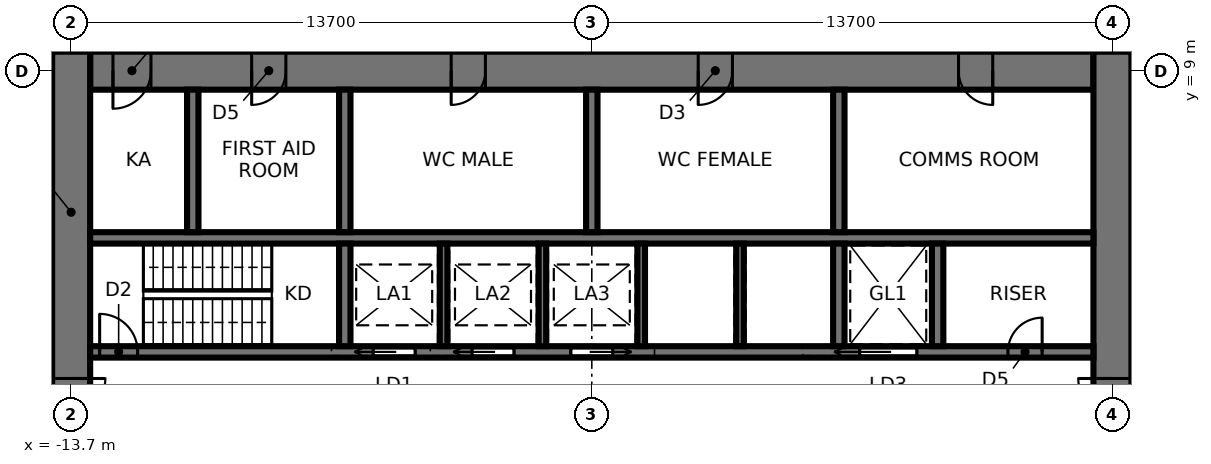
"""IFC4 building model, lengths in metres.
Left out: names, types, materials, properties, quantities, classifications, styles, units other than length and angle.
Written with IfcOpenShell. Run it as: python <this file> out.ifc"""

import sys

from ifc_helpers import new_model, si_unit, direction, frame, frame_2d, origin, place, context, subcontext, project, spatial, rectangle, extrude, element, fill, save


model = new_model("IFC4")
c1 = context("Model", 3, precision=1e-05, world=origin(), true_north=direction((0.0, 1.0)))
c2 = subcontext(c1, "Body", "Model", "MODEL_VIEW")
j1 = project(units=[si_unit("LENGTHUNIT", "METRE"), si_unit("PLANEANGLEUNIT", "RADIAN")], contexts=[c1])
p1 = place(None, origin())
s1 = spatial("IfcSite", under=j1, at=p1, CompositionType="ELEMENT")
p2 = place(p1, origin())
s2 = spatial("IfcBuilding", under=s1, at=p2, CompositionType="ELEMENT")
p3 = place(p2, frame((0.0, 0.0, 5.6)))
s3 = spatial("IfcBuildingStorey", under=s2, at=p3, CompositionType="ELEMENT", Elevation=5.6)
p4 = place(p3, frame((13.2, 9.0, 0.0), z_axis=(0.0, 0.0, 1.0), x_axis=(-1.0, 0.0, 0.0)))
e1 = element("IfcWall", 1, at=p4, inside=s3, PredefinedType="SHEAR", context=c2, shape_type="SweptSolid", body=[
    extrude(rectangle(XDim=26.4, YDim=1.0, at=frame_2d((13.2, 0.0))), origin(), (0.0, 0.0, 1.0), 5.0),
])
p5 = place(p4, frame((2.65, 0.0, 0.0)))
e2 = element("IfcOpeningElement", 2, at=p5, cuts=e1, PredefinedType="OPENING", context=c2, shape_type="SweptSolid", body=[
    extrude(rectangle(XDim=0.9, YDim=2.1, at=frame_2d((0.45, 1.05))), frame((0.0, 0.51, 0.0), z_axis=(0.0, -1.0, 0.0), x_axis=(1.0, 0.0, 0.0)), (0.0, 0.0, 1.0), 1.02),
])
p6 = place(p4, frame((9.5, 0.0, 0.0)))
e3 = element("IfcOpeningElement", 3, at=p6, cuts=e1, PredefinedType="OPENING", context=c2, shape_type="SweptSolid", body=[
    extrude(rectangle(XDim=0.9, YDim=2.1, at=frame_2d((0.45, 1.05))), frame((0.0, 0.51, 0.0), z_axis=(0.0, -1.0, 0.0), x_axis=(1.0, 0.0, 0.0)), (0.0, 0.0, 1.0), 1.02),
])
p7 = place(p4, frame((16.0, 0.0, 0.0)))
e4 = element("IfcOpeningElement", 4, at=p7, cuts=e1, PredefinedType="OPENING", context=c2, shape_type="SweptSolid", body=[
    extrude(rectangle(XDim=0.9, YDim=2.1, at=frame_2d((0.45, 1.05))), frame((0.0, 0.51, 0.0), z_axis=(0.0, -1.0, 0.0), x_axis=(1.0, 0.0, 0.0)), (0.0, 0.0, 1.0), 1.02),
])
p8 = place(p4, frame((21.25, 0.0, 0.0)))
e5 = element("IfcOpeningElement", 5, at=p8, cuts=e1, PredefinedType="OPENING", context=c2, shape_type="SweptSolid", body=[
    extrude(rectangle(XDim=0.9, YDim=2.1, at=frame_2d((0.45, 1.05))), frame((0.0, 0.51, 0.0), z_axis=(0.0, -1.0, 0.0), x_axis=(1.0, 0.0, 0.0)), (0.0, 0.0, 1.0), 1.02),
])
p9 = place(p4, frame((24.8, 0.0, 0.0)))
e6 = element("IfcOpeningElement", 6, at=p9, cuts=e1, PredefinedType="OPENING", context=c2, shape_type="SweptSolid", body=[
    extrude(rectangle(XDim=1.0, YDim=2.1, at=frame_2d((0.5, 1.05))), frame((0.0, 0.51, 0.0), z_axis=(0.0, -1.0, 0.0), x_axis=(1.0, 0.0, 0.0)), (0.0, 0.0, 1.0), 1.02),
])
p10 = place(p3, frame((13.7, -9.5, 0.0), z_axis=(0.0, 0.0, 1.0), x_axis=(0.0, 1.0, 0.0)))
e7 = element("IfcWall", 7, at=p10, inside=s3, PredefinedType="SHEAR", context=c2, shape_type="SweptSolid", body=[
    extrude(rectangle(XDim=19.0, YDim=1.0, at=frame_2d((9.5, 0.0))), origin(), (0.0, 0.0, 1.0), 5.0),
])
p11 = place(p10, frame((8.6, 0.0, 0.0)))
e8 = element("IfcOpeningElement", 8, at=p11, cuts=e7, PredefinedType="OPENING", context=c2, shape_type="SweptSolid", body=[
    extrude(rectangle(XDim=1.8, YDim=2.4, at=frame_2d((0.9, 1.2))), frame((0.0, 0.51, 0.0), z_axis=(0.0, -1.0, 0.0), x_axis=(1.0, 0.0, 0.0)), (0.0, 0.0, 1.0), 1.02),
])
p12 = place(p3, frame((-13.7, 9.5, 0.0), z_axis=(0.0, 0.0, 1.0), x_axis=(0.0, -1.0, 0.0)))
e9 = element("IfcWall", 9, at=p12, inside=s3, PredefinedType="SHEAR", context=c2, shape_type="SweptSolid", body=[
    extrude(rectangle(XDim=19.0, YDim=1.0, at=frame_2d((9.5, 0.0))), origin(), (0.0, 0.0, 1.0), 5.0),
])
p13 = place(p12, frame((8.6, 0.0, 0.0)))
e10 = element("IfcOpeningElement", 10, at=p13, cuts=e9, PredefinedType="OPENING", context=c2, shape_type="SweptSolid", body=[
    extrude(rectangle(XDim=1.8, YDim=2.4, at=frame_2d((0.9, 1.2))), frame((0.0, 0.51, 0.0), z_axis=(0.0, -1.0, 0.0), x_axis=(1.0, 0.0, 0.0)), (0.0, 0.0, 1.0), 1.02),
])
p14 = place(p3, frame((-13.2, 1.6, 0.0), z_axis=(0.0, 0.0, 1.0), x_axis=(1.0, 0.0, 0.0)))
e11 = element("IfcWall", 11, at=p14, inside=s3, PredefinedType="SHEAR", context=c2, shape_type="SweptSolid", body=[
    extrude(rectangle(XDim=26.4, YDim=0.3, at=frame_2d((13.2, 0.0))), origin(), (0.0, 0.0, 1.0), 5.0),
])
p15 = place(p14, frame((0.25, 0.0, 0.0)))
e12 = element("IfcOpeningElement", 12, at=p15, cuts=e11, PredefinedType="OPENING", context=c2, shape_type="SweptSolid", body=[
    extrude(rectangle(XDim=1.0, YDim=2.1, at=frame_2d((0.5, 1.05))), frame((0.0, 0.16, 0.0), z_axis=(0.0, -1.0, 0.0), x_axis=(1.0, 0.0, 0.0)), (0.0, 0.0, 1.0), 0.32),
])
p16 = place(p14, frame((20.25, 0.0, 0.0)))
e13 = element("IfcOpeningElement", 13, at=p16, cuts=e11, PredefinedType="OPENING", context=c2, shape_type="SweptSolid", body=[
    extrude(rectangle(XDim=1.5, YDim=2.4, at=frame_2d((0.75, 1.2))), frame((0.0, 0.16, 0.0), z_axis=(0.0, -1.0, 0.0), x_axis=(1.0, 0.0, 0.0)), (0.0, 0.0, 1.0), 0.32),
])
p17 = place(p14, frame((7.45, 0.0, 0.0)))
e14 = element("IfcOpeningElement", 14, at=p17, cuts=e11, PredefinedType="OPENING", context=c2, shape_type="SweptSolid", body=[
    extrude(rectangle(XDim=1.1, YDim=2.3, at=frame_2d((0.55, 1.15))), frame((0.0, 0.16, 0.0), z_axis=(0.0, -1.0, 0.0), x_axis=(1.0, 0.0, 0.0)), (0.0, 0.0, 1.0), 0.32),
])
p18 = place(p14, frame((10.05, 0.0, 0.0)))
e15 = element("IfcOpeningElement", 15, at=p18, cuts=e11, PredefinedType="OPENING", context=c2, shape_type="SweptSolid", body=[
    extrude(rectangle(XDim=1.1, YDim=2.3, at=frame_2d((0.55, 1.15))), frame((0.0, 0.16, 0.0), z_axis=(0.0, -1.0, 0.0), x_axis=(1.0, 0.0, 0.0)), (0.0, 0.0, 1.0), 0.32),
])
p19 = place(p14, frame((12.65, 0.0, 0.0)))
e16 = element("IfcOpeningElement", 16, at=p19, cuts=e11, PredefinedType="OPENING", context=c2, shape_type="SweptSolid", body=[
    extrude(rectangle(XDim=1.1, YDim=2.3, at=frame_2d((0.55, 1.15))), frame((0.0, 0.16, 0.0), z_axis=(0.0, -1.0, 0.0), x_axis=(1.0, 0.0, 0.0)), (0.0, 0.0, 1.0), 0.32),
])
p20 = place(p14, frame((24.15, 0.0, 0.0)))
e17 = element("IfcOpeningElement", 17, at=p20, cuts=e11, PredefinedType="OPENING", context=c2, shape_type="SweptSolid", body=[
    extrude(rectangle(XDim=0.9, YDim=2.1, at=frame_2d((0.45, 1.05))), frame((0.0, 0.16, 0.0), z_axis=(0.0, -1.0, 0.0), x_axis=(1.0, 0.0, 0.0)), (0.0, 0.0, 1.0), 0.32),
])
p21 = place(p3, frame((-13.2, 4.6, 0.0), z_axis=(0.0, 0.0, 1.0), x_axis=(1.0, 0.0, 0.0)))
e18 = element("IfcWall", 18, at=p21, inside=s3, PredefinedType="SHEAR", context=c2, shape_type="SweptSolid", body=[
    extrude(rectangle(XDim=26.4, YDim=0.3, at=frame_2d((13.2, 0.0))), origin(), (0.0, 0.0, 1.0), 5.0),
])
p22 = place(p3, frame((-6.5, 1.75, 0.0), z_axis=(0.0, 0.0, 1.0), x_axis=(0.0, 1.0, 0.0)))
e19 = element("IfcWall", 19, at=p22, inside=s3, PredefinedType="SHEAR", context=c2, shape_type="SweptSolid", body=[
    extrude(rectangle(XDim=2.7, YDim=0.3, at=frame_2d((1.35, 0.0))), origin(), (0.0, 0.0, 1.0), 5.0),
])
p23 = place(p3, frame((-6.5, 4.75, 0.0), z_axis=(0.0, 0.0, 1.0), x_axis=(0.0, 1.0, 0.0)))
e20 = element("IfcWall", 20, at=p23, inside=s3, PredefinedType="SHEAR", context=c2, shape_type="SweptSolid", body=[
    extrude(rectangle(XDim=3.75, YDim=0.3, at=frame_2d((1.875, 0.0))), origin(), (0.0, 0.0, 1.0), 5.0),
])
p24 = place(p3, frame((6.5, 1.75, 0.0), z_axis=(0.0, 0.0, 1.0), x_axis=(0.0, 1.0, 0.0)))
e21 = element("IfcWall", 21, at=p24, inside=s3, PredefinedType="SHEAR", context=c2, shape_type="SweptSolid", body=[
    extrude(rectangle(XDim=2.7, YDim=0.3, at=frame_2d((1.35, 0.0))), origin(), (0.0, 0.0, 1.0), 5.0),
])
p25 = place(p3, frame((6.5, 4.75, 0.0), z_axis=(0.0, 0.0, 1.0), x_axis=(0.0, 1.0, 0.0)))
e22 = element("IfcWall", 22, at=p25, inside=s3, PredefinedType="SHEAR", context=c2, shape_type="SweptSolid", body=[
    extrude(rectangle(XDim=3.75, YDim=0.3, at=frame_2d((1.875, 0.0))), origin(), (0.0, 0.0, 1.0), 5.0),
])
for number, where, z_axis, x_axis in (
    (23, (-3.9, 1.75, 0.0), (0.0, 0.0, 1.0), (0.0, 1.0, 0.0)),
    (24, (-1.3, 1.75, 0.0), (0.0, 0.0, 1.0), (0.0, 1.0, 0.0)),
    (25, (1.3, 1.75, 0.0), (0.0, 0.0, 1.0), (0.0, 1.0, 0.0)),
    (26, (3.9, 1.75, 0.0), (0.0, 0.0, 1.0), (0.0, 1.0, 0.0)),
):
    element("IfcWall", number, at=place(p3, frame(where, z_axis=z_axis, x_axis=x_axis)), inside=s3, PredefinedType="SHEAR", context=c2, shape_type="SweptSolid", body=[
        extrude(rectangle(XDim=2.7, YDim=0.2, at=frame_2d((1.35, 0.0))), origin(), (0.0, 0.0, 1.0), 5.0),
    ])
for number, where, z_axis, x_axis in (
    (27, (0.0, 4.75, 0.0), (0.0, 0.0, 1.0), (0.0, 1.0, 0.0)),
    (28, (-10.5, 4.75, 0.0), (0.0, 0.0, 1.0), (0.0, 1.0, 0.0)),
):
    element("IfcWall", number, at=place(p3, frame(where, z_axis=z_axis, x_axis=x_axis)), inside=s3, PredefinedType="SHEAR", context=c2, shape_type="SweptSolid", body=[
        extrude(rectangle(XDim=3.75, YDim=0.3, at=frame_2d((1.875, 0.0))), origin(), (0.0, 0.0, 1.0), 5.0),
    ])
p26 = place(p3, frame((9.1, 1.75, 0.0), z_axis=(0.0, 0.0, 1.0), x_axis=(0.0, 1.0, 0.0)))
e29 = element("IfcWall", 29, at=p26, inside=s3, PredefinedType="SHEAR", context=c2, shape_type="SweptSolid", body=[
    extrude(rectangle(XDim=2.7, YDim=0.3, at=frame_2d((1.35, 0.0))), origin(), (0.0, 0.0, 1.0), 5.0),
])
p27 = place(p13, origin())
e30 = element("IfcDoor", 30, at=p27, inside=s3, OperationType="DOUBLE_DOOR_SINGLE_SWING", PredefinedType="DOOR", context=c2, shape_type="SweptSolid", body=[
    extrude(rectangle(XDim=1.72, YDim=2.36, at=frame_2d((0.9, 1.18))), frame((0.0, 0.025, 0.0), z_axis=(0.0, -1.0, 0.0), x_axis=(1.0, 0.0, 0.0)), (0.0, 0.0, 1.0), 0.05),
    extrude(rectangle(XDim=0.04, YDim=2.4, at=frame_2d((0.02, 1.2))), frame((0.0, 0.25, 0.0), z_axis=(0.0, -1.0, 0.0), x_axis=(1.0, 0.0, 0.0)), (0.0, 0.0, 1.0), 0.5),
    extrude(rectangle(XDim=0.04, YDim=2.4, at=frame_2d((1.78, 1.2))), frame((0.0, 0.25, 0.0), z_axis=(0.0, -1.0, 0.0), x_axis=(1.0, 0.0, 0.0)), (0.0, 0.0, 1.0), 0.5),
    extrude(rectangle(XDim=1.72, YDim=0.04, at=frame_2d((0.9, 2.38))), frame((0.0, 0.25, 0.0), z_axis=(0.0, -1.0, 0.0), x_axis=(1.0, 0.0, 0.0)), (0.0, 0.0, 1.0), 0.5),
])
fill(e10, e30)
p28 = place(p11, origin())
e31 = element("IfcDoor", 31, at=p28, inside=s3, OperationType="DOUBLE_DOOR_SINGLE_SWING", PredefinedType="DOOR", context=c2, shape_type="SweptSolid", body=[
    extrude(rectangle(XDim=1.72, YDim=2.36, at=frame_2d((0.9, 1.18))), frame((0.0, 0.025, 0.0), z_axis=(0.0, -1.0, 0.0), x_axis=(1.0, 0.0, 0.0)), (0.0, 0.0, 1.0), 0.05),
    extrude(rectangle(XDim=0.04, YDim=2.4, at=frame_2d((0.02, 1.2))), frame((0.0, 0.25, 0.0), z_axis=(0.0, -1.0, 0.0), x_axis=(1.0, 0.0, 0.0)), (0.0, 0.0, 1.0), 0.5),
    extrude(rectangle(XDim=0.04, YDim=2.4, at=frame_2d((1.78, 1.2))), frame((0.0, 0.25, 0.0), z_axis=(0.0, -1.0, 0.0), x_axis=(1.0, 0.0, 0.0)), (0.0, 0.0, 1.0), 0.5),
    extrude(rectangle(XDim=1.72, YDim=0.04, at=frame_2d((0.9, 2.38))), frame((0.0, 0.25, 0.0), z_axis=(0.0, -1.0, 0.0), x_axis=(1.0, 0.0, 0.0)), (0.0, 0.0, 1.0), 0.5),
])
fill(e8, e31)
p29 = place(p15, origin())
e32 = element("IfcDoor", 32, at=p29, inside=s3, OperationType="SINGLE_SWING_LEFT", PredefinedType="DOOR", context=c2, shape_type="SweptSolid", body=[
    extrude(rectangle(XDim=1.0, YDim=2.1, at=frame_2d((0.5, 1.05))), frame((0.0, 0.025, 0.0), z_axis=(0.0, -1.0, 0.0), x_axis=(1.0, 0.0, 0.0)), (0.0, 0.0, 1.0), 0.05),
])
fill(e12, e32)
p30 = place(p16, origin())
e33 = element("IfcDoor", 33, at=p30, inside=s3, OperationType="SLIDING_TO_LEFT", PredefinedType="DOOR", context=c2, shape_type="SweptSolid", body=[
    extrude(rectangle(XDim=1.5, YDim=2.4, at=frame_2d((0.75, 1.2))), frame((0.0, 0.025, 0.0), z_axis=(0.0, -1.0, 0.0), x_axis=(1.0, 0.0, 0.0)), (0.0, 0.0, 1.0), 0.05),
])
fill(e13, e33)
p31 = place(p17, origin())
e34 = element("IfcDoor", 34, at=p31, inside=s3, OperationType="SLIDING_TO_LEFT", PredefinedType="DOOR", context=c2, shape_type="SweptSolid", body=[
    extrude(rectangle(XDim=1.1, YDim=2.3, at=frame_2d((0.55, 1.15))), frame((0.0, 0.025, 0.0), z_axis=(0.0, -1.0, 0.0), x_axis=(1.0, 0.0, 0.0)), (0.0, 0.0, 1.0), 0.05),
])
fill(e14, e34)
p32 = place(p18, origin())
e35 = element("IfcDoor", 35, at=p32, inside=s3, OperationType="SLIDING_TO_LEFT", PredefinedType="DOOR", context=c2, shape_type="SweptSolid", body=[
    extrude(rectangle(XDim=1.1, YDim=2.3, at=frame_2d((0.55, 1.15))), frame((0.0, 0.025, 0.0), z_axis=(0.0, -1.0, 0.0), x_axis=(1.0, 0.0, 0.0)), (0.0, 0.0, 1.0), 0.05),
])
fill(e15, e35)
p33 = place(p19, origin())
e36 = element("IfcDoor", 36, at=p33, inside=s3, OperationType="SLIDING_TO_RIGHT", PredefinedType="DOOR", context=c2, shape_type="SweptSolid", body=[
    extrude(rectangle(XDim=1.1, YDim=2.3, at=frame_2d((0.55, 1.15))), frame((0.0, 0.025, 0.0), z_axis=(0.0, -1.0, 0.0), x_axis=(1.0, 0.0, 0.0)), (0.0, 0.0, 1.0), 0.05),
])
fill(e16, e36)
p34 = place(p20, origin())
e37 = element("IfcDoor", 37, at=p34, inside=s3, OperationType="SINGLE_SWING_RIGHT", PredefinedType="DOOR", context=c2, shape_type="SweptSolid", body=[
    extrude(rectangle(XDim=0.9, YDim=2.1, at=frame_2d((0.45, 1.05))), frame((0.0, 0.025, 0.0), z_axis=(0.0, -1.0, 0.0), x_axis=(1.0, 0.0, 0.0)), (0.0, 0.0, 1.0), 0.05),
])
fill(e17, e37)
p35 = place(p5, origin())
e38 = element("IfcDoor", 38, at=p35, inside=s3, OperationType="SINGLE_SWING_LEFT", PredefinedType="DOOR", context=c2, shape_type="SweptSolid", body=[
    extrude(rectangle(XDim=0.82, YDim=2.06, at=frame_2d((0.45, 1.03))), frame((0.0, 0.025, 0.0), z_axis=(0.0, -1.0, 0.0), x_axis=(1.0, 0.0, 0.0)), (0.0, 0.0, 1.0), 0.05),
    extrude(rectangle(XDim=0.04, YDim=2.1, at=frame_2d((0.02, 1.05))), frame((0.0, 0.25, 0.0), z_axis=(0.0, -1.0, 0.0), x_axis=(1.0, 0.0, 0.0)), (0.0, 0.0, 1.0), 0.5),
    extrude(rectangle(XDim=0.04, YDim=2.1, at=frame_2d((0.88, 1.05))), frame((0.0, 0.25, 0.0), z_axis=(0.0, -1.0, 0.0), x_axis=(1.0, 0.0, 0.0)), (0.0, 0.0, 1.0), 0.5),
    extrude(rectangle(XDim=0.82, YDim=0.04, at=frame_2d((0.45, 2.08))), frame((0.0, 0.25, 0.0), z_axis=(0.0, -1.0, 0.0), x_axis=(1.0, 0.0, 0.0)), (0.0, 0.0, 1.0), 0.5),
])
fill(e2, e38)
p36 = place(p6, origin())
e39 = element("IfcDoor", 39, at=p36, inside=s3, OperationType="SINGLE_SWING_RIGHT", PredefinedType="DOOR", context=c2, shape_type="SweptSolid", body=[
    extrude(rectangle(XDim=0.82, YDim=2.06, at=frame_2d((0.45, 1.03))), frame((0.0, 0.025, 0.0), z_axis=(0.0, -1.0, 0.0), x_axis=(1.0, 0.0, 0.0)), (0.0, 0.0, 1.0), 0.05),
    extrude(rectangle(XDim=0.04, YDim=2.1, at=frame_2d((0.02, 1.05))), frame((0.0, 0.25, 0.0), z_axis=(0.0, -1.0, 0.0), x_axis=(1.0, 0.0, 0.0)), (0.0, 0.0, 1.0), 0.5),
    extrude(rectangle(XDim=0.04, YDim=2.1, at=frame_2d((0.88, 1.05))), frame((0.0, 0.25, 0.0), z_axis=(0.0, -1.0, 0.0), x_axis=(1.0, 0.0, 0.0)), (0.0, 0.0, 1.0), 0.5),
    extrude(rectangle(XDim=0.82, YDim=0.04, at=frame_2d((0.45, 2.08))), frame((0.0, 0.25, 0.0), z_axis=(0.0, -1.0, 0.0), x_axis=(1.0, 0.0, 0.0)), (0.0, 0.0, 1.0), 0.5),
])
fill(e3, e39)
p37 = place(p7, origin())
e40 = element("IfcDoor", 40, at=p37, inside=s3, OperationType="SINGLE_SWING_RIGHT", PredefinedType="DOOR", context=c2, shape_type="SweptSolid", body=[
    extrude(rectangle(XDim=0.82, YDim=2.06, at=frame_2d((0.45, 1.03))), frame((0.0, 0.025, 0.0), z_axis=(0.0, -1.0, 0.0), x_axis=(1.0, 0.0, 0.0)), (0.0, 0.0, 1.0), 0.05),
    extrude(rectangle(XDim=0.04, YDim=2.1, at=frame_2d((0.02, 1.05))), frame((0.0, 0.25, 0.0), z_axis=(0.0, -1.0, 0.0), x_axis=(1.0, 0.0, 0.0)), (0.0, 0.0, 1.0), 0.5),
    extrude(rectangle(XDim=0.04, YDim=2.1, at=frame_2d((0.88, 1.05))), frame((0.0, 0.25, 0.0), z_axis=(0.0, -1.0, 0.0), x_axis=(1.0, 0.0, 0.0)), (0.0, 0.0, 1.0), 0.5),
    extrude(rectangle(XDim=0.82, YDim=0.04, at=frame_2d((0.45, 2.08))), frame((0.0, 0.25, 0.0), z_axis=(0.0, -1.0, 0.0), x_axis=(1.0, 0.0, 0.0)), (0.0, 0.0, 1.0), 0.5),
])
fill(e4, e40)
p38 = place(p8, origin())
e41 = element("IfcDoor", 41, at=p38, inside=s3, OperationType="SINGLE_SWING_RIGHT", PredefinedType="DOOR", context=c2, shape_type="SweptSolid", body=[
    extrude(rectangle(XDim=0.82, YDim=2.06, at=frame_2d((0.45, 1.03))), frame((0.0, 0.025, 0.0), z_axis=(0.0, -1.0, 0.0), x_axis=(1.0, 0.0, 0.0)), (0.0, 0.0, 1.0), 0.05),
    extrude(rectangle(XDim=0.04, YDim=2.1, at=frame_2d((0.02, 1.05))), frame((0.0, 0.25, 0.0), z_axis=(0.0, -1.0, 0.0), x_axis=(1.0, 0.0, 0.0)), (0.0, 0.0, 1.0), 0.5),
    extrude(rectangle(XDim=0.04, YDim=2.1, at=frame_2d((0.88, 1.05))), frame((0.0, 0.25, 0.0), z_axis=(0.0, -1.0, 0.0), x_axis=(1.0, 0.0, 0.0)), (0.0, 0.0, 1.0), 0.5),
    extrude(rectangle(XDim=0.82, YDim=0.04, at=frame_2d((0.45, 2.08))), frame((0.0, 0.25, 0.0), z_axis=(0.0, -1.0, 0.0), x_axis=(1.0, 0.0, 0.0)), (0.0, 0.0, 1.0), 0.5),
])
fill(e5, e41)
p39 = place(p9, origin())
e42 = element("IfcDoor", 42, at=p39, inside=s3, OperationType="SINGLE_SWING_RIGHT", PredefinedType="DOOR", context=c2, shape_type="SweptSolid", body=[
    extrude(rectangle(XDim=0.92, YDim=2.06, at=frame_2d((0.5, 1.03))), frame((0.0, 0.025, 0.0), z_axis=(0.0, -1.0, 0.0), x_axis=(1.0, 0.0, 0.0)), (0.0, 0.0, 1.0), 0.05),
    extrude(rectangle(XDim=0.04, YDim=2.1, at=frame_2d((0.02, 1.05))), frame((0.0, 0.25, 0.0), z_axis=(0.0, -1.0, 0.0), x_axis=(1.0, 0.0, 0.0)), (0.0, 0.0, 1.0), 0.5),
    extrude(rectangle(XDim=0.04, YDim=2.1, at=frame_2d((0.98, 1.05))), frame((0.0, 0.25, 0.0), z_axis=(0.0, -1.0, 0.0), x_axis=(1.0, 0.0, 0.0)), (0.0, 0.0, 1.0), 0.5),
    extrude(rectangle(XDim=0.92, YDim=0.04, at=frame_2d((0.5, 2.08))), frame((0.0, 0.25, 0.0), z_axis=(0.0, -1.0, 0.0), x_axis=(1.0, 0.0, 0.0)), (0.0, 0.0, 1.0), 0.5),
])
fill(e6, e42)
save(model, sys.argv[1])
